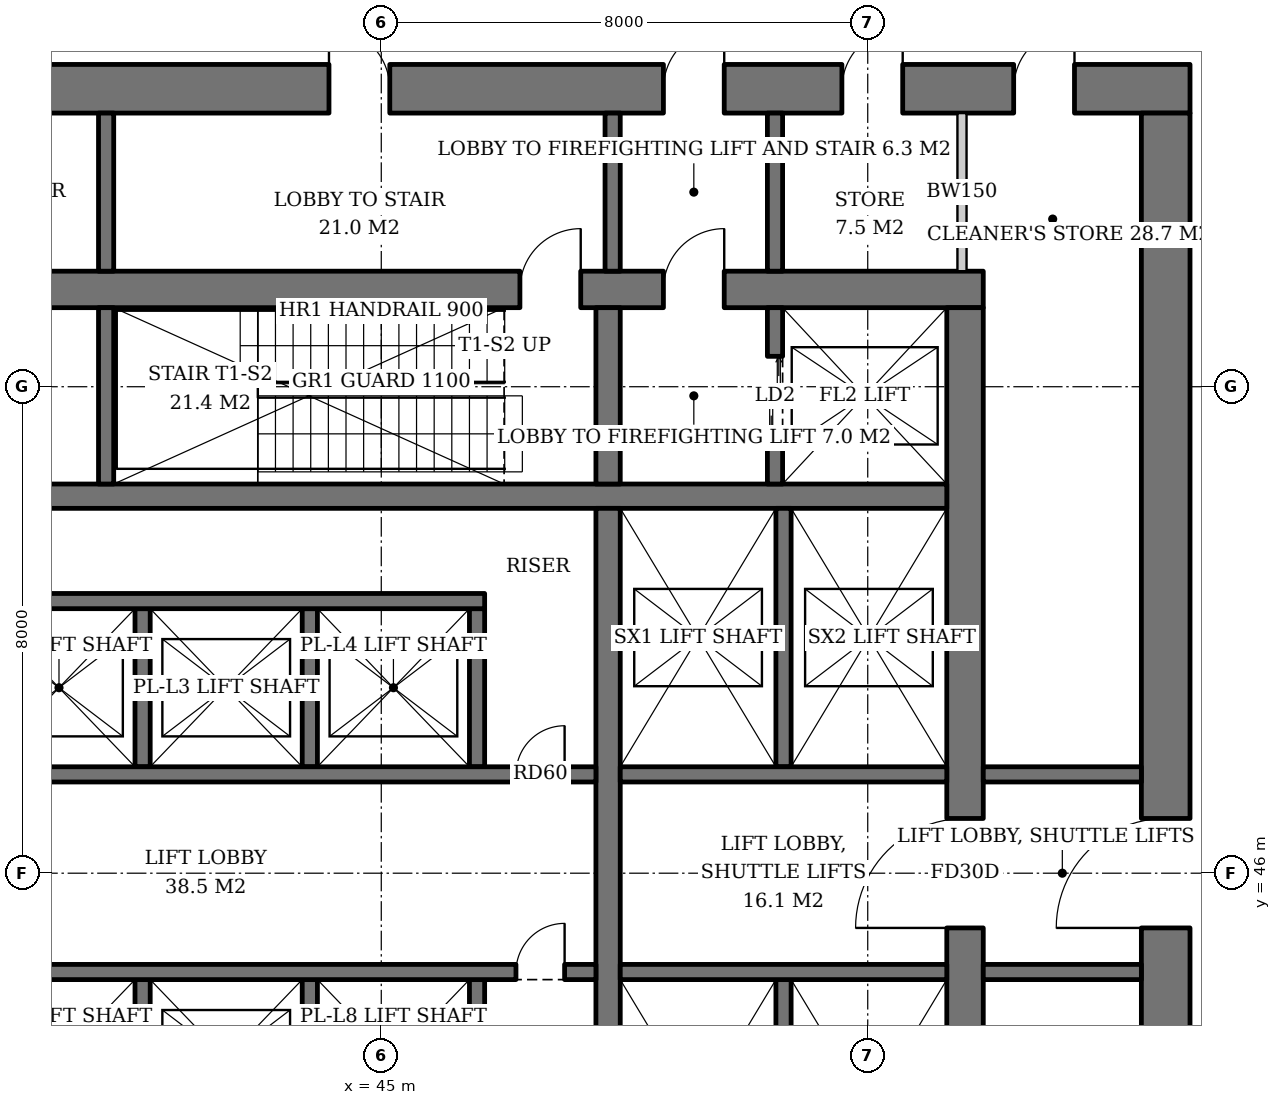
"""IFC4 building model, lengths in metres.
Left out: names, types, materials, properties, quantities, classifications, styles, units other than length and angle.
Written with IfcOpenShell. Run it as: python <this file> out.ifc"""

import sys

from ifc_helpers import new_model, si_unit, direction, frame, frame_2d, origin, place, context, subcontext, project, spatial, rectangle, extrude, element, fill, save


model = new_model("IFC4")
c1 = context("Model", 3, precision=1e-05, world=origin(), true_north=direction((0.0, 1.0)))
c2 = subcontext(c1, "Body", "Model", "MODEL_VIEW")
j1 = project(units=[si_unit("LENGTHUNIT", "METRE"), si_unit("PLANEANGLEUNIT", "RADIAN")], contexts=[c1])
p1 = place(None, origin())
s1 = spatial("IfcSite", under=j1, at=p1, CompositionType="ELEMENT")
p2 = place(p1, origin())
s2 = spatial("IfcBuilding", under=s1, at=p2, CompositionType="ELEMENT")
p3 = place(p2, frame((0.0, 0.0, 16.0)))
s3 = spatial("IfcBuildingStorey", under=s2, at=p3, CompositionType="ELEMENT", Elevation=16.0)
p4 = place(p3, frame((35.1, 55.6, 0.0), z_axis=(0.0, 0.0, 1.0), x_axis=(1.0, 0.0, 0.0)))
e1 = element("IfcWall", 1, at=p4, inside=s3, PredefinedType="SHEAR", context=c2, shape_type="SweptSolid", body=[
    extrude(rectangle(XDim=19.8, YDim=0.6, at=frame_2d((9.9, 0.0))), origin(), (0.0, 0.0, 1.0), 5.0),
])
p5 = place(p4, frame((14.54, 0.0, 0.0)))
e2 = element("IfcOpeningElement", 2, at=p5, cuts=e1, PredefinedType="OPENING", context=c2, shape_type="SweptSolid", body=[
    extrude(rectangle(XDim=1.0, YDim=2.1, at=frame_2d((0.5, 1.05))), frame((0.0, 0.31, 0.0), z_axis=(0.0, -1.0, 0.0), x_axis=(1.0, 0.0, 0.0)), (0.0, 0.0, 1.0), 0.62),
])
p6 = place(p4, frame((12.18, 0.0, 0.0)))
e3 = element("IfcOpeningElement", 3, at=p6, cuts=e1, PredefinedType="OPENING", context=c2, shape_type="SweptSolid", body=[
    extrude(rectangle(XDim=1.0, YDim=2.1, at=frame_2d((0.5, 1.05))), frame((0.0, 0.31, 0.0), z_axis=(0.0, -1.0, 0.0), x_axis=(1.0, 0.0, 0.0)), (0.0, 0.0, 1.0), 0.62),
])
p7 = place(p4, frame((2.425, 0.0, 0.0)))
e4 = element("IfcOpeningElement", 4, at=p7, cuts=e1, PredefinedType="OPENING", context=c2, shape_type="SweptSolid", body=[
    extrude(rectangle(XDim=1.0, YDim=2.1, at=frame_2d((0.5, 1.05))), frame((0.0, 0.31, 0.0), z_axis=(0.0, -1.0, 0.0), x_axis=(1.0, 0.0, 0.0)), (0.0, 0.0, 1.0), 0.62),
])
p8 = place(p3, frame((54.6, 36.7, 0.0), z_axis=(0.0, 0.0, 1.0), x_axis=(0.0, 1.0, 0.0)))
e5 = element("IfcWall", 5, at=p8, inside=s3, PredefinedType="SHEAR", context=c2, shape_type="SweptSolid", body=[
    extrude(rectangle(XDim=18.6, YDim=0.6, at=frame_2d((9.3, 0.0))), origin(), (0.0, 0.0, 1.0), 5.0),
])
p9 = place(p8, frame((8.4, 0.0, 0.0)))
e6 = element("IfcOpeningElement", 6, at=p9, cuts=e5, PredefinedType="OPENING", context=c2, shape_type="SweptSolid", body=[
    extrude(rectangle(XDim=1.8, YDim=2.4, at=frame_2d((0.9, 1.2))), frame((0.0, 0.31, 0.0), z_axis=(0.0, -1.0, 0.0), x_axis=(1.0, 0.0, 0.0)), (0.0, 0.0, 1.0), 0.62),
])
p10 = place(p3, frame((31.7, 58.9, 0.0), z_axis=(0.0, 0.0, 1.0), x_axis=(1.0, 0.0, 0.0)))
e7 = element("IfcWall", 7, at=p10, inside=s3, PredefinedType="SHEAR", context=c2, shape_type="SweptSolid", body=[
    extrude(rectangle(XDim=26.6, YDim=0.8, at=frame_2d((13.3, 0.0))), origin(), (0.0, 0.0, 1.0), 5.0),
])
p11 = place(p10, frame((17.94, 0.0, 0.0)))
e8 = element("IfcOpeningElement", 8, at=p11, cuts=e7, PredefinedType="OPENING", context=c2, shape_type="SweptSolid", body=[
    extrude(rectangle(XDim=1.0, YDim=2.1, at=frame_2d((0.5, 1.05))), frame((0.0, 0.41, 0.0), z_axis=(0.0, -1.0, 0.0), x_axis=(1.0, 0.0, 0.0)), (0.0, 0.0, 1.0), 0.82),
])
p12 = place(p10, frame((12.44, 0.0, 0.0)))
e9 = element("IfcOpeningElement", 9, at=p12, cuts=e7, PredefinedType="OPENING", context=c2, shape_type="SweptSolid", body=[
    extrude(rectangle(XDim=1.0, YDim=2.1, at=frame_2d((0.5, 1.05))), frame((0.0, 0.41, 0.0), z_axis=(0.0, -1.0, 0.0), x_axis=(1.0, 0.0, 0.0)), (0.0, 0.0, 1.0), 0.82),
])
p13 = place(p10, frame((5.825, 0.0, 0.0)))
e10 = element("IfcOpeningElement", 10, at=p13, cuts=e7, PredefinedType="OPENING", context=c2, shape_type="SweptSolid", body=[
    extrude(rectangle(XDim=1.0, YDim=2.1, at=frame_2d((0.5, 1.05))), frame((0.0, 0.41, 0.0), z_axis=(0.0, -1.0, 0.0), x_axis=(1.0, 0.0, 0.0)), (0.0, 0.0, 1.0), 0.82),
])
p14 = place(p10, frame((1.05, 0.0, 0.0)))
e11 = element("IfcOpeningElement", 11, at=p14, cuts=e7, PredefinedType="OPENING", context=c2, shape_type="SweptSolid", body=[
    extrude(rectangle(XDim=1.0, YDim=2.1, at=frame_2d((0.5, 1.05))), frame((0.0, 0.41, 0.0), z_axis=(0.0, -1.0, 0.0), x_axis=(1.0, 0.0, 0.0)), (0.0, 0.0, 1.0), 0.82),
])
p15 = place(p10, frame((2.637, 0.0, 0.0)))
e12 = element("IfcOpeningElement", 12, at=p15, cuts=e7, PredefinedType="OPENING", context=c2, shape_type="SweptSolid", body=[
    extrude(rectangle(XDim=1.0, YDim=2.1, at=frame_2d((0.5, 1.05))), frame((0.0, 0.41, 0.0), z_axis=(0.0, -1.0, 0.0), x_axis=(1.0, 0.0, 0.0)), (0.0, 0.0, 1.0), 0.82),
])
p16 = place(p10, frame((4.229, 0.0, 0.0)))
e13 = element("IfcOpeningElement", 13, at=p16, cuts=e7, PredefinedType="OPENING", context=c2, shape_type="SweptSolid", body=[
    extrude(rectangle(XDim=1.0, YDim=2.1, at=frame_2d((0.5, 1.05))), frame((0.0, 0.41, 0.0), z_axis=(0.0, -1.0, 0.0), x_axis=(1.0, 0.0, 0.0)), (0.0, 0.0, 1.0), 0.82),
])
p17 = place(p10, frame((20.875, 0.0, 0.0)))
e14 = element("IfcOpeningElement", 14, at=p17, cuts=e7, PredefinedType="OPENING", context=c2, shape_type="SweptSolid", body=[
    extrude(rectangle(XDim=1.0, YDim=2.1, at=frame_2d((0.5, 1.05))), frame((0.0, 0.41, 0.0), z_axis=(0.0, -1.0, 0.0), x_axis=(1.0, 0.0, 0.0)), (0.0, 0.0, 1.0), 0.82),
])
p18 = place(p10, frame((23.7, 0.0, 0.0)))
e15 = element("IfcOpeningElement", 15, at=p18, cuts=e7, PredefinedType="OPENING", context=c2, shape_type="SweptSolid", body=[
    extrude(rectangle(XDim=1.0, YDim=2.1, at=frame_2d((0.5, 1.05))), frame((0.0, 0.41, 0.0), z_axis=(0.0, -1.0, 0.0), x_axis=(1.0, 0.0, 0.0)), (0.0, 0.0, 1.0), 0.82),
])
p19 = place(p3, frame((57.9, 33.5, 0.0), z_axis=(0.0, 0.0, 1.0), x_axis=(0.0, 1.0, 0.0)))
e16 = element("IfcWall", 16, at=p19, inside=s3, PredefinedType="SHEAR", context=c2, shape_type="SweptSolid", body=[
    extrude(rectangle(XDim=25.0, YDim=0.8, at=frame_2d((12.5, 0.0))), origin(), (0.0, 0.0, 1.0), 5.0),
])
p20 = place(p19, frame((11.6, 0.0, 0.0)))
e17 = element("IfcOpeningElement", 17, at=p20, cuts=e16, PredefinedType="OPENING", context=c2, shape_type="SweptSolid", body=[
    extrude(rectangle(XDim=1.8, YDim=2.4, at=frame_2d((0.9, 1.2))), frame((0.0, 0.41, 0.0), z_axis=(0.0, -1.0, 0.0), x_axis=(1.0, 0.0, 0.0)), (0.0, 0.0, 1.0), 0.82),
])
p21 = place(p3, frame((35.7, 52.2, 0.0), z_axis=(0.0, 0.0, 1.0), x_axis=(1.0, 0.0, 0.0)))
e18 = element("IfcWall", 18, at=p21, inside=s3, PredefinedType="SHEAR", context=c2, shape_type="SweptSolid", body=[
    extrude(rectangle(XDim=18.6, YDim=0.4, at=frame_2d((9.3, 0.0))), origin(), (0.0, 0.0, 1.0), 5.0),
])
p22 = place(p3, frame((48.73, 40.0, 0.0), z_axis=(0.0, 0.0, 1.0), x_axis=(0.0, 1.0, 0.0)))
e19 = element("IfcWall", 19, at=p22, inside=s3, PredefinedType="SHEAR", context=c2, shape_type="SweptSolid", body=[
    extrude(rectangle(XDim=12.0, YDim=0.4, at=frame_2d((6.0, 0.0))), origin(), (0.0, 0.0, 1.0), 5.0),
])
p23 = place(p3, frame((48.73, 52.4, 0.0), z_axis=(0.0, 0.0, 1.0), x_axis=(0.0, 1.0, 0.0)))
e20 = element("IfcWall", 20, at=p23, inside=s3, PredefinedType="SHEAR", context=c2, shape_type="SweptSolid", body=[
    extrude(rectangle(XDim=2.9, YDim=0.4, at=frame_2d((1.45, 0.0))), origin(), (0.0, 0.0, 1.0), 5.0),
])
p24 = place(p3, frame((40.475, 52.4, 0.0), z_axis=(0.0, 0.0, 1.0), x_axis=(0.0, 1.0, 0.0)))
e21 = element("IfcWall", 21, at=p24, inside=s3, PredefinedType="SHEAR", context=c2, shape_type="SweptSolid", body=[
    extrude(rectangle(XDim=2.9, YDim=0.25, at=frame_2d((1.45, 0.0))), origin(), (0.0, 0.0, 1.0), 5.0),
])
p25 = place(p3, frame((51.475, 52.4, 0.0), z_axis=(0.0, 0.0, 1.0), x_axis=(0.0, 1.0, 0.0)))
e22 = element("IfcWall", 22, at=p25, inside=s3, PredefinedType="SHEAR", context=c2, shape_type="SweptSolid", body=[
    extrude(rectangle(XDim=2.9, YDim=0.25, at=frame_2d((1.45, 0.0))), origin(), (0.0, 0.0, 1.0), 5.0),
])
p26 = place(p25, frame((0.8, 0.0, 0.0)))
e23 = element("IfcOpeningElement", 23, at=p26, cuts=e22, PredefinedType="OPENING", context=c2, shape_type="SweptSolid", body=[
    extrude(rectangle(XDim=1.3, YDim=2.2, at=frame_2d((0.65, 1.1))), frame((0.0, 0.135, 0.0), z_axis=(0.0, -1.0, 0.0), x_axis=(1.0, 0.0, 0.0)), (0.0, 0.0, 1.0), 0.27),
])
for number, where, z_axis, x_axis in (
    (24, (41.075, 47.75, 0.0), (0.0, 0.0, 1.0), (0.0, 1.0, 0.0)),
    (25, (43.825, 47.75, 0.0), (0.0, 0.0, 1.0), (0.0, 1.0, 0.0)),
    (26, (46.575, 47.75, 0.0), (0.0, 0.0, 1.0), (0.0, 1.0, 0.0)),
):
    element("IfcWall", number, at=place(p3, frame(where, z_axis=z_axis, x_axis=x_axis)), inside=s3, PredefinedType="SHEAR", context=c2, shape_type="SweptSolid", body=[
        extrude(rectangle(XDim=2.6, YDim=0.25, at=frame_2d((1.3, 0.0))), origin(), (0.0, 0.0, 1.0), 5.0),
    ])
p27 = place(p3, frame((35.7, 50.475, 0.0), z_axis=(0.0, 0.0, 1.0), x_axis=(1.0, 0.0, 0.0)))
e27 = element("IfcWall", 27, at=p27, inside=s3, PredefinedType="SHEAR", context=c2, shape_type="SweptSolid", body=[
    extrude(rectangle(XDim=11.0, YDim=0.25, at=frame_2d((5.5, 0.0))), origin(), (0.0, 0.0, 1.0), 5.0),
])
p28 = place(p3, frame((35.7, 47.625, 0.0), z_axis=(0.0, 0.0, 1.0), x_axis=(1.0, 0.0, 0.0)))
e28 = element("IfcWall", 28, at=p28, inside=s3, PredefinedType="SHEAR", context=c2, shape_type="SweptSolid", body=[
    extrude(rectangle(XDim=12.83, YDim=0.25, at=frame_2d((6.415, 0.0))), origin(), (0.0, 0.0, 1.0), 5.0),
])
p29 = place(p28, frame((11.515, 0.0, 0.0)))
e29 = element("IfcOpeningElement", 29, at=p29, cuts=e28, PredefinedType="OPENING", context=c2, shape_type="SweptSolid", body=[
    extrude(rectangle(XDim=0.8, YDim=2.0, at=frame_2d((0.4, 1.0))), frame((0.0, 0.135, 0.0), z_axis=(0.0, -1.0, 0.0), x_axis=(1.0, 0.0, 0.0)), (0.0, 0.0, 1.0), 0.27),
])
for number, where, z_axis, x_axis in (
    (30, (41.075, 44.25, 0.0), (0.0, 0.0, 1.0), (0.0, -1.0, 0.0)),
    (31, (43.825, 44.25, 0.0), (0.0, 0.0, 1.0), (0.0, -1.0, 0.0)),
    (32, (46.575, 44.25, 0.0), (0.0, 0.0, 1.0), (0.0, -1.0, 0.0)),
):
    element("IfcWall", number, at=place(p3, frame(where, z_axis=z_axis, x_axis=x_axis)), inside=s3, PredefinedType="SHEAR", context=c2, shape_type="SweptSolid", body=[
        extrude(rectangle(XDim=2.6, YDim=0.25, at=frame_2d((1.3, 0.0))), origin(), (0.0, 0.0, 1.0), 5.0),
    ])
p30 = place(p3, frame((35.7, 44.375, 0.0), z_axis=(0.0, 0.0, 1.0), x_axis=(1.0, 0.0, 0.0)))
e33 = element("IfcWall", 33, at=p30, inside=s3, PredefinedType="SHEAR", context=c2, shape_type="SweptSolid", body=[
    extrude(rectangle(XDim=12.83, YDim=0.25, at=frame_2d((6.415, 0.0))), origin(), (0.0, 0.0, 1.0), 5.0),
])
p31 = place(p30, frame((11.515, 0.0, 0.0)))
e34 = element("IfcOpeningElement", 34, at=p31, cuts=e33, PredefinedType="OPENING", context=c2, shape_type="SweptSolid", body=[
    extrude(rectangle(XDim=0.8, YDim=2.0, at=frame_2d((0.4, 1.0))), frame((0.0, 0.135, 0.0), z_axis=(0.0, -1.0, 0.0), x_axis=(1.0, 0.0, 0.0)), (0.0, 0.0, 1.0), 0.27),
])
p32 = place(p3, frame((51.615, 47.75, 0.0), z_axis=(0.0, 0.0, 1.0), x_axis=(0.0, 1.0, 0.0)))
e35 = element("IfcWall", 35, at=p32, inside=s3, PredefinedType="SHEAR", context=c2, shape_type="SweptSolid", body=[
    extrude(rectangle(XDim=4.25, YDim=0.25, at=frame_2d((2.125, 0.0))), origin(), (0.0, 0.0, 1.0), 5.0),
])
p33 = place(p3, frame((48.93, 47.625, 0.0), z_axis=(0.0, 0.0, 1.0), x_axis=(1.0, 0.0, 0.0)))
e36 = element("IfcWall", 36, at=p33, inside=s3, PredefinedType="SHEAR", context=c2, shape_type="SweptSolid", body=[
    extrude(rectangle(XDim=5.37, YDim=0.25, at=frame_2d((2.685, 0.0))), origin(), (0.0, 0.0, 1.0), 5.0),
])
p34 = place(p3, frame((51.615, 44.25, 0.0), z_axis=(0.0, 0.0, 1.0), x_axis=(0.0, -1.0, 0.0)))
e37 = element("IfcWall", 37, at=p34, inside=s3, PredefinedType="SHEAR", context=c2, shape_type="SweptSolid", body=[
    extrude(rectangle(XDim=4.25, YDim=0.25, at=frame_2d((2.125, 0.0))), origin(), (0.0, 0.0, 1.0), 5.0),
])
p35 = place(p3, frame((48.93, 44.375, 0.0), z_axis=(0.0, 0.0, 1.0), x_axis=(1.0, 0.0, 0.0)))
e38 = element("IfcWall", 38, at=p35, inside=s3, PredefinedType="SHEAR", context=c2, shape_type="SweptSolid", body=[
    extrude(rectangle(XDim=5.37, YDim=0.25, at=frame_2d((2.685, 0.0))), origin(), (0.0, 0.0, 1.0), 5.0),
])
for number, where, z_axis, x_axis in (
    (39, (48.805, 55.9, 0.0), (0.0, 0.0, 1.0), (0.0, 1.0, 0.0)),
    (40, (51.475, 55.9, 0.0), (0.0, 0.0, 1.0), (0.0, 1.0, 0.0)),
    (41, (54.9, 44.375, 0.0), (0.0, 0.0, 1.0), (1.0, 0.0, 0.0)),
    (42, (54.9, 47.625, 0.0), (0.0, 0.0, 1.0), (1.0, 0.0, 0.0)),
    (43, (40.475, 55.9, 0.0), (0.0, 0.0, 1.0), (0.0, 1.0, 0.0)),
):
    element("IfcWall", number, at=place(p3, frame(where, z_axis=z_axis, x_axis=x_axis)), inside=s3, PredefinedType="SOLIDWALL", context=c2, shape_type="SweptSolid", body=[
        extrude(rectangle(XDim=2.6, YDim=0.25, at=frame_2d((1.3, 0.0))), origin(), (0.0, 0.0, 1.0), 4.7),
    ])
p36 = place(p3, frame((54.55, 55.9, 0.0), z_axis=(0.0, 0.0, 1.0), x_axis=(0.0, 1.0, 0.0)))
e44 = element("IfcWall", 44, at=p36, inside=s3, PredefinedType="SOLIDWALL", context=c2, shape_type="SweptSolid", body=[
    extrude(rectangle(XDim=2.6, YDim=0.15, at=frame_2d((1.3, 0.0))), origin(), (0.0, 0.0, 1.0), 4.7),
])
p37 = place(p26, origin())
e45 = element("IfcDoor", 45, at=p37, inside=s3, OperationType="DOUBLE_DOOR_SLIDING", PredefinedType="DOOR", context=c2, shape_type="SweptSolid", body=[
    extrude(rectangle(XDim=1.3, YDim=2.2, at=frame_2d((0.65, 1.1))), frame((0.0, 0.025, 0.0), z_axis=(0.0, -1.0, 0.0), x_axis=(1.0, 0.0, 0.0)), (0.0, 0.0, 1.0), 0.05),
])
fill(e23, e45)
p38 = place(p29, origin())
e46 = element("IfcDoor", 46, at=p38, inside=s3, OperationType="SINGLE_SWING_RIGHT", PredefinedType="DOOR", context=c2, shape_type="SweptSolid", body=[
    extrude(rectangle(XDim=0.8, YDim=2.0, at=frame_2d((0.4, 1.0))), frame((0.0, 0.025, 0.0), z_axis=(0.0, -1.0, 0.0), x_axis=(1.0, 0.0, 0.0)), (0.0, 0.0, 1.0), 0.05),
])
fill(e29, e46)
p39 = place(p31, origin())
e47 = element("IfcDoor", 47, at=p39, inside=s3, OperationType="SINGLE_SWING_RIGHT", PredefinedType="DOOR", context=c2, shape_type="SweptSolid", body=[
    extrude(rectangle(XDim=0.8, YDim=2.0, at=frame_2d((0.4, 1.0))), frame((0.0, 0.025, 0.0), z_axis=(0.0, -1.0, 0.0), x_axis=(1.0, 0.0, 0.0)), (0.0, 0.0, 1.0), 0.05),
])
fill(e34, e47)
p40 = place(p5, origin())
e48 = element("IfcDoor", 48, at=p40, inside=s3, OperationType="SINGLE_SWING_RIGHT", PredefinedType="DOOR", context=c2, shape_type="SweptSolid", body=[
    extrude(rectangle(XDim=1.0, YDim=2.1, at=frame_2d((0.5, 1.05))), frame((0.0, 0.025, 0.0), z_axis=(0.0, -1.0, 0.0), x_axis=(1.0, 0.0, 0.0)), (0.0, 0.0, 1.0), 0.05),
])
fill(e2, e48)
p41 = place(p9, origin())
e49 = element("IfcDoor", 49, at=p41, inside=s3, OperationType="DOUBLE_DOOR_SINGLE_SWING", PredefinedType="DOOR", context=c2, shape_type="SweptSolid", body=[
    extrude(rectangle(XDim=1.8, YDim=2.4, at=frame_2d((0.9, 1.2))), frame((0.0, 0.025, 0.0), z_axis=(0.0, -1.0, 0.0), x_axis=(1.0, 0.0, 0.0)), (0.0, 0.0, 1.0), 0.05),
])
fill(e6, e49)
p42 = place(p6, origin())
e50 = element("IfcDoor", 50, at=p42, inside=s3, OperationType="SINGLE_SWING_RIGHT", PredefinedType="DOOR", context=c2, shape_type="SweptSolid", body=[
    extrude(rectangle(XDim=1.0, YDim=2.1, at=frame_2d((0.5, 1.05))), frame((0.0, 0.025, 0.0), z_axis=(0.0, -1.0, 0.0), x_axis=(1.0, 0.0, 0.0)), (0.0, 0.0, 1.0), 0.05),
])
fill(e3, e50)
p43 = place(p20, origin())
e51 = element("IfcDoor", 51, at=p43, inside=s3, OperationType="DOUBLE_DOOR_SINGLE_SWING", PredefinedType="DOOR", context=c2, shape_type="SweptSolid", body=[
    extrude(rectangle(XDim=1.8, YDim=2.4, at=frame_2d((0.9, 1.2))), frame((0.0, 0.025, 0.0), z_axis=(0.0, -1.0, 0.0), x_axis=(1.0, 0.0, 0.0)), (0.0, 0.0, 1.0), 0.05),
])
fill(e17, e51)
p44 = place(p11, origin())
e52 = element("IfcDoor", 52, at=p44, inside=s3, OperationType="SINGLE_SWING_RIGHT", PredefinedType="DOOR", context=c2, shape_type="SweptSolid", body=[
    extrude(rectangle(XDim=1.0, YDim=2.1, at=frame_2d((0.5, 1.05))), frame((0.0, 0.025, 0.0), z_axis=(0.0, -1.0, 0.0), x_axis=(1.0, 0.0, 0.0)), (0.0, 0.0, 1.0), 0.05),
])
fill(e8, e52)
p45 = place(p12, origin())
e53 = element("IfcDoor", 53, at=p45, inside=s3, OperationType="SINGLE_SWING_LEFT", PredefinedType="DOOR", context=c2, shape_type="SweptSolid", body=[
    extrude(rectangle(XDim=1.0, YDim=2.1, at=frame_2d((0.5, 1.05))), frame((0.0, 0.025, 0.0), z_axis=(0.0, -1.0, 0.0), x_axis=(1.0, 0.0, 0.0)), (0.0, 0.0, 1.0), 0.05),
])
fill(e9, e53)
p46 = place(p17, origin())
e54 = element("IfcDoor", 54, at=p46, inside=s3, OperationType="SINGLE_SWING_RIGHT", PredefinedType="DOOR", context=c2, shape_type="SweptSolid", body=[
    extrude(rectangle(XDim=1.0, YDim=2.1, at=frame_2d((0.5, 1.05))), frame((0.0, -0.34, 0.0), z_axis=(0.0, -1.0, 0.0), x_axis=(1.0, 0.0, 0.0)), (0.0, 0.0, 1.0), 0.05),
])
fill(e14, e54)
p47 = place(p18, origin())
e55 = element("IfcDoor", 55, at=p47, inside=s3, OperationType="SINGLE_SWING_RIGHT", PredefinedType="DOOR", context=c2, shape_type="SweptSolid", body=[
    extrude(rectangle(XDim=1.0, YDim=2.1, at=frame_2d((0.5, 1.05))), frame((0.0, -0.34, 0.0), z_axis=(0.0, -1.0, 0.0), x_axis=(1.0, 0.0, 0.0)), (0.0, 0.0, 1.0), 0.05),
])
fill(e15, e55)
save(model, sys.argv[1])
